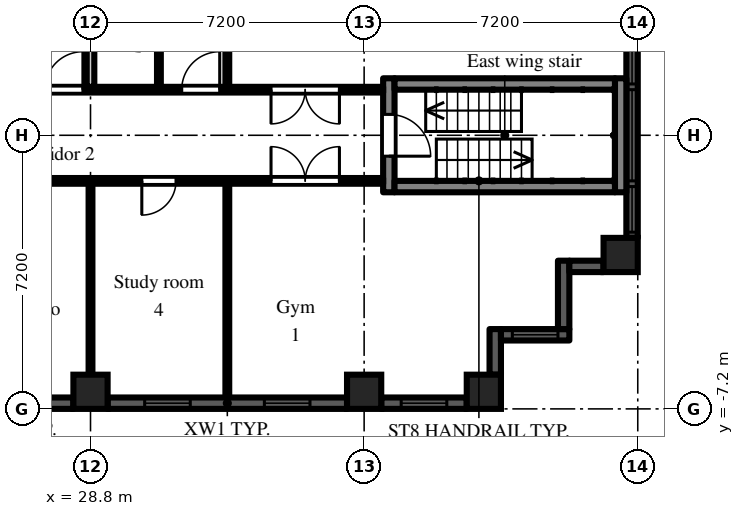
"""IFC4 building model, lengths in metres.
Left out: names, types, materials, properties, quantities, classifications, styles, units other than length and angle.
Written with IfcOpenShell. Run it as: python <this file> out.ifc"""

import sys

from ifc_helpers import new_model, si_unit, direction, frame, frame_2d, origin, origin_2d, place, context, subcontext, project, spatial, rectangle, extrude, element, fill, save


model = new_model("IFC4")
c1 = context("Model", 3, precision=1e-05, world=origin(), true_north=direction((0.0, 1.0)))
c2 = subcontext(c1, "Body", "Model", "MODEL_VIEW")
j1 = project(units=[si_unit("LENGTHUNIT", "METRE"), si_unit("PLANEANGLEUNIT", "RADIAN")], contexts=[c1])
p1 = place(None, origin())
s1 = spatial("IfcSite", under=j1, at=p1, CompositionType="ELEMENT")
p2 = place(p1, origin())
s2 = spatial("IfcBuilding", under=s1, at=p2, CompositionType="ELEMENT")
p3 = place(p2, frame((0.0, 0.0, 84.9)))
s3 = spatial("IfcBuildingStorey", under=s2, at=p3, CompositionType="ELEMENT", Elevation=84.9)
for number, where, z_axis, x_axis in (
    (1, (28.8, -6.75, 0.0), (0.0, 0.0, 1.0), (1.0, 0.0, 0.0)),
    (2, (36.0, -6.75, 0.0), (0.0, 0.0, 1.0), (1.0, 0.0, 0.0)),
    (3, (39.15, -6.75, 0.0), (0.0, 0.0, 1.0), (1.0, 0.0, 0.0)),
    (4, (42.75, -3.15, 0.0), (0.0, 0.0, 1.0), (1.0, 0.0, 0.0)),
):
    element("IfcColumn", number, at=place(p3, frame(where, z_axis=z_axis, x_axis=x_axis)), inside=s3, PredefinedType="COLUMN", context=c2, shape_type="SweptSolid", body=[
        extrude(rectangle(XDim=0.9, YDim=0.9, at=origin_2d()), origin(), (0.0, 0.0, 1.0), 3.0),
    ])
p4 = place(p3, frame((25.2, -7.05, 0.0), z_axis=(0.0, 0.0, 1.0), x_axis=(1.0, 0.0, 0.0)))
e5 = element("IfcWall", 5, at=p4, inside=s3, PredefinedType="SOLIDWALL", context=c2, shape_type="SweptSolid", body=[
    extrude(rectangle(XDim=3.15, YDim=0.3, at=frame_2d((1.575, 0.0))), origin(), (0.0, 0.0, 1.0), 2.1),
])
p5 = place(p4, frame((0.975, 0.0, 0.2)))
e6 = element("IfcOpeningElement", 6, at=p5, cuts=e5, PredefinedType="OPENING", context=c2, shape_type="SweptSolid", body=[
    extrude(rectangle(XDim=1.2, YDim=1.85, at=frame_2d((0.6, 0.925))), frame((0.0, 0.16, 0.0), z_axis=(0.0, -1.0, 0.0), x_axis=(1.0, 0.0, 0.0)), (0.0, 0.0, 1.0), 0.32),
])
p6 = place(p3, frame((29.25, -7.05, 0.0), z_axis=(0.0, 0.0, 1.0), x_axis=(1.0, 0.0, 0.0)))
e7 = element("IfcWall", 7, at=p6, inside=s3, PredefinedType="SOLIDWALL", context=c2, shape_type="SweptSolid", body=[
    extrude(rectangle(XDim=6.3, YDim=0.3, at=frame_2d((3.15, 0.0))), origin(), (0.0, 0.0, 1.0), 2.1),
])
p7 = place(p6, frame((0.975, 0.0, 0.2)))
e8 = element("IfcOpeningElement", 8, at=p7, cuts=e7, PredefinedType="OPENING", context=c2, shape_type="SweptSolid", body=[
    extrude(rectangle(XDim=1.2, YDim=1.85, at=frame_2d((0.6, 0.925))), frame((0.0, 0.16, 0.0), z_axis=(0.0, -1.0, 0.0), x_axis=(1.0, 0.0, 0.0)), (0.0, 0.0, 1.0), 0.32),
])
p8 = place(p6, frame((4.125, 0.0, 0.2)))
e9 = element("IfcOpeningElement", 9, at=p8, cuts=e7, PredefinedType="OPENING", context=c2, shape_type="SweptSolid", body=[
    extrude(rectangle(XDim=1.2, YDim=1.85, at=frame_2d((0.6, 0.925))), frame((0.0, 0.16, 0.0), z_axis=(0.0, -1.0, 0.0), x_axis=(1.0, 0.0, 0.0)), (0.0, 0.0, 1.0), 0.32),
])
p9 = place(p3, frame((36.45, -7.05, 0.0), z_axis=(0.0, 0.0, 1.0), x_axis=(1.0, 0.0, 0.0)))
e10 = element("IfcWall", 10, at=p9, inside=s3, PredefinedType="SOLIDWALL", context=c2, shape_type="SweptSolid", body=[
    extrude(rectangle(XDim=2.25, YDim=0.3, at=frame_2d((1.125, 0.0))), origin(), (0.0, 0.0, 1.0), 2.1),
])
p10 = place(p9, frame((0.525, 0.0, 0.2)))
e11 = element("IfcOpeningElement", 11, at=p10, cuts=e10, PredefinedType="OPENING", context=c2, shape_type="SweptSolid", body=[
    extrude(rectangle(XDim=1.2, YDim=1.85, at=frame_2d((0.6, 0.925))), frame((0.0, 0.16, 0.0), z_axis=(0.0, -1.0, 0.0), x_axis=(1.0, 0.0, 0.0)), (0.0, 0.0, 1.0), 0.32),
])
p11 = place(p3, frame((39.45, -6.3, 0.0), z_axis=(0.0, 0.0, 1.0), x_axis=(0.0, 1.0, 0.0)))
e12 = element("IfcWall", 12, at=p11, inside=s3, PredefinedType="SOLIDWALL", context=c2, shape_type="SweptSolid", body=[
    extrude(rectangle(XDim=1.2, YDim=0.3, at=frame_2d((0.6, 0.0))), origin(), (0.0, 0.0, 1.0), 2.575),
])
p12 = place(p3, frame((39.6, -5.25, 0.0), z_axis=(0.0, 0.0, 1.0), x_axis=(1.0, 0.0, 0.0)))
e13 = element("IfcWall", 13, at=p12, inside=s3, PredefinedType="SOLIDWALL", context=c2, shape_type="SweptSolid", body=[
    extrude(rectangle(XDim=1.8, YDim=0.3, at=frame_2d((0.9, 0.0))), origin(), (0.0, 0.0, 1.0), 2.575),
])
p13 = place(p12, frame((0.3, 0.0, 0.2)))
e14 = element("IfcOpeningElement", 14, at=p13, cuts=e13, PredefinedType="OPENING", context=c2, shape_type="SweptSolid", body=[
    extrude(rectangle(XDim=1.2, YDim=1.85, at=frame_2d((0.6, 0.925))), frame((0.0, 0.16, 0.0), z_axis=(0.0, -1.0, 0.0), x_axis=(1.0, 0.0, 0.0)), (0.0, 0.0, 1.0), 0.32),
])
p14 = place(p3, frame((41.25, -5.1, 0.0), z_axis=(0.0, 0.0, 1.0), x_axis=(0.0, 1.0, 0.0)))
e15 = element("IfcWall", 15, at=p14, inside=s3, PredefinedType="SOLIDWALL", context=c2, shape_type="SweptSolid", body=[
    extrude(rectangle(XDim=1.8, YDim=0.3, at=frame_2d((0.9, 0.0))), origin(), (0.0, 0.0, 1.0), 2.575),
])
p15 = place(p3, frame((41.4, -3.45, 0.0), z_axis=(0.0, 0.0, 1.0), x_axis=(1.0, 0.0, 0.0)))
e16 = element("IfcWall", 16, at=p15, inside=s3, PredefinedType="SOLIDWALL", context=c2, shape_type="SweptSolid", body=[
    extrude(rectangle(XDim=0.9, YDim=0.3, at=frame_2d((0.45, 0.0))), origin(), (0.0, 0.0, 1.0), 2.575),
])
p16 = place(p3, frame((43.05, -2.7, 0.0), z_axis=(0.0, 0.0, 1.0), x_axis=(0.0, 1.0, 0.0)))
e17 = element("IfcWall", 17, at=p16, inside=s3, PredefinedType="SOLIDWALL", context=c2, shape_type="SweptSolid", body=[
    extrude(rectangle(XDim=5.4, YDim=0.3, at=frame_2d((2.7, 0.0))), origin(), (0.0, 0.0, 1.0), 2.1),
])
p17 = place(p16, frame((1.5, 0.0, 0.2)))
e18 = element("IfcOpeningElement", 18, at=p17, cuts=e17, PredefinedType="OPENING", context=c2, shape_type="SweptSolid", body=[
    extrude(rectangle(XDim=2.4, YDim=1.85, at=frame_2d((1.2, 0.925))), frame((0.0, 0.16, 0.0), z_axis=(0.0, -1.0, 0.0), x_axis=(1.0, 0.0, 0.0)), (0.0, 0.0, 1.0), 0.32),
])
p18 = place(p16, frame((0.15, 0.0, 0.2)))
e19 = element("IfcOpeningElement", 19, at=p18, cuts=e17, PredefinedType="OPENING", context=c2, shape_type="SweptSolid", body=[
    extrude(rectangle(XDim=1.2, YDim=1.85, at=frame_2d((0.6, 0.925))), frame((0.0, 0.16, 0.0), z_axis=(0.0, -1.0, 0.0), x_axis=(1.0, 0.0, 0.0)), (0.0, 0.0, 1.0), 0.32),
])
p19 = place(p16, frame((4.05, 0.0, 0.2)))
e20 = element("IfcOpeningElement", 20, at=p19, cuts=e17, PredefinedType="OPENING", context=c2, shape_type="SweptSolid", body=[
    extrude(rectangle(XDim=1.2, YDim=1.85, at=frame_2d((0.6, 0.925))), frame((0.0, 0.16, 0.0), z_axis=(0.0, -1.0, 0.0), x_axis=(1.0, 0.0, 0.0)), (0.0, 0.0, 1.0), 0.32),
])
p20 = place(p3, frame((36.65, -1.5, 0.0), z_axis=(0.0, 0.0, 1.0), x_axis=(0.0, 1.0, 0.0)))
e21 = element("IfcWall", 21, at=p20, inside=s3, PredefinedType="SHEAR", context=c2, shape_type="SweptSolid", body=[
    extrude(rectangle(XDim=3.0, YDim=0.3, at=frame_2d((1.5, 0.0))), origin(), (0.0, 0.0, 1.0), 2.575),
])
p21 = place(p20, frame((0.95, 0.0, 0.0)))
e22 = element("IfcOpeningElement", 22, at=p21, cuts=e21, PredefinedType="OPENING", context=c2, shape_type="SweptSolid", body=[
    extrude(rectangle(XDim=1.1, YDim=2.1, at=frame_2d((0.55, 1.05))), frame((0.0, 0.16, 0.0), z_axis=(0.0, -1.0, 0.0), x_axis=(1.0, 0.0, 0.0)), (0.0, 0.0, 1.0), 0.32),
])
p22 = place(p3, frame((42.75, -1.5, 0.0), z_axis=(0.0, 0.0, 1.0), x_axis=(0.0, 1.0, 0.0)))
e23 = element("IfcWall", 23, at=p22, inside=s3, PredefinedType="SHEAR", context=c2, shape_type="SweptSolid", body=[
    extrude(rectangle(XDim=3.0, YDim=0.3, at=frame_2d((1.5, 0.0))), origin(), (0.0, 0.0, 1.0), 2.575),
])
for number, where, z_axis, x_axis in (
    (24, (36.8, -1.35, 0.0), (0.0, 0.0, 1.0), (1.0, 0.0, 0.0)),
    (25, (36.8, 1.35, 0.0), (0.0, 0.0, 1.0), (1.0, 0.0, 0.0)),
):
    element("IfcWall", number, at=place(p3, frame(where, z_axis=z_axis, x_axis=x_axis)), inside=s3, PredefinedType="SHEAR", context=c2, shape_type="SweptSolid", body=[
        extrude(rectangle(XDim=5.8, YDim=0.3, at=frame_2d((2.9, 0.0))), origin(), (0.0, 0.0, 1.0), 2.575),
    ])
p23 = place(p3, frame((21.6, -1.2, 0.0), z_axis=(0.0, 0.0, 1.0), x_axis=(1.0, 0.0, 0.0)))
e26 = element("IfcWall", 26, at=p23, inside=s3, PredefinedType="PARTITIONING", context=c2, shape_type="SweptSolid", body=[
    extrude(rectangle(XDim=14.9, YDim=0.15, at=frame_2d((7.45, 0.0))), origin(), (0.0, 0.0, 1.0), 2.575),
])
p24 = place(p23, frame((2.7, 0.0, 0.0)))
e27 = element("IfcOpeningElement", 27, at=p24, cuts=e26, PredefinedType="OPENING", context=c2, shape_type="SweptSolid", body=[
    extrude(rectangle(XDim=1.8, YDim=2.1, at=frame_2d((0.9, 1.05))), frame((0.0, 0.085, 0.0), z_axis=(0.0, -1.0, 0.0), x_axis=(1.0, 0.0, 0.0)), (0.0, 0.0, 1.0), 0.17),
])
p25 = place(p23, frame((8.55, 0.0, 0.0)))
e28 = element("IfcOpeningElement", 28, at=p25, cuts=e26, PredefinedType="OPENING", context=c2, shape_type="SweptSolid", body=[
    extrude(rectangle(XDim=0.9, YDim=2.1, at=frame_2d((0.45, 1.05))), frame((0.0, 0.085, 0.0), z_axis=(0.0, -1.0, 0.0), x_axis=(1.0, 0.0, 0.0)), (0.0, 0.0, 1.0), 0.17),
])
p26 = place(p23, frame((11.95, 0.0, 0.0)))
e29 = element("IfcOpeningElement", 29, at=p26, cuts=e26, PredefinedType="OPENING", context=c2, shape_type="SweptSolid", body=[
    extrude(rectangle(XDim=1.8, YDim=2.1, at=frame_2d((0.9, 1.05))), frame((0.0, 0.085, 0.0), z_axis=(0.0, -1.0, 0.0), x_axis=(1.0, 0.0, 0.0)), (0.0, 0.0, 1.0), 0.17),
])
p27 = place(p3, frame((21.6, 1.2, 0.0), z_axis=(0.0, 0.0, 1.0), x_axis=(1.0, 0.0, 0.0)))
e30 = element("IfcWall", 30, at=p27, inside=s3, PredefinedType="PARTITIONING", context=c2, shape_type="SweptSolid", body=[
    extrude(rectangle(XDim=14.9, YDim=0.15, at=frame_2d((7.45, 0.0))), origin(), (0.0, 0.0, 1.0), 2.575),
])
p28 = place(p27, frame((6.0, 0.0, 0.0)))
e31 = element("IfcOpeningElement", 31, at=p28, cuts=e30, PredefinedType="OPENING", context=c2, shape_type="SweptSolid", body=[
    extrude(rectangle(XDim=1.0, YDim=2.1, at=frame_2d((0.5, 1.05))), frame((0.0, 0.085, 0.0), z_axis=(0.0, -1.0, 0.0), x_axis=(1.0, 0.0, 0.0)), (0.0, 0.0, 1.0), 0.17),
])
p29 = place(p27, frame((9.6, 0.0, 0.0)))
e32 = element("IfcOpeningElement", 32, at=p29, cuts=e30, PredefinedType="OPENING", context=c2, shape_type="SweptSolid", body=[
    extrude(rectangle(XDim=1.0, YDim=2.1, at=frame_2d((0.5, 1.05))), frame((0.0, 0.085, 0.0), z_axis=(0.0, -1.0, 0.0), x_axis=(1.0, 0.0, 0.0)), (0.0, 0.0, 1.0), 0.17),
])
p30 = place(p27, frame((11.95, 0.0, 0.0)))
e33 = element("IfcOpeningElement", 33, at=p30, cuts=e30, PredefinedType="OPENING", context=c2, shape_type="SweptSolid", body=[
    extrude(rectangle(XDim=1.8, YDim=2.1, at=frame_2d((0.9, 1.05))), frame((0.0, 0.085, 0.0), z_axis=(0.0, -1.0, 0.0), x_axis=(1.0, 0.0, 0.0)), (0.0, 0.0, 1.0), 0.17),
])
p31 = place(p3, frame((28.8, -6.9, 0.0), z_axis=(0.0, 0.0, 1.0), x_axis=(0.0, 1.0, 0.0)))
e34 = element("IfcWall", 34, at=p31, inside=s3, PredefinedType="PARTITIONING", context=c2, shape_type="SweptSolid", body=[
    extrude(rectangle(XDim=5.625, YDim=0.1, at=frame_2d((2.812, 0.0))), origin(), (0.0, 0.0, 1.0), 2.575),
])
p32 = place(p3, frame((28.8, 1.275, 0.0), z_axis=(0.0, 0.0, 1.0), x_axis=(0.0, 1.0, 0.0)))
e35 = element("IfcWall", 35, at=p32, inside=s3, PredefinedType="PARTITIONING", context=c2, shape_type="SweptSolid", body=[
    extrude(rectangle(XDim=5.625, YDim=0.2, at=frame_2d((2.812, 0.0))), origin(), (0.0, 0.0, 1.0), 2.575),
])
p33 = place(p3, frame((30.6, 1.275, 0.0), z_axis=(0.0, 0.0, 1.0), x_axis=(0.0, 1.0, 0.0)))
e36 = element("IfcWall", 36, at=p33, inside=s3, PredefinedType="PARTITIONING", context=c2, shape_type="SweptSolid", body=[
    extrude(rectangle(XDim=1.675, YDim=0.1, at=frame_2d((0.837, 0.0))), origin(), (0.0, 0.0, 1.0), 2.575),
])
for number, where, z_axis, x_axis in (
    (37, (32.4, -6.9, 0.0), (0.0, 0.0, 1.0), (0.0, 1.0, 0.0)),
    (38, (32.4, 1.275, 0.0), (0.0, 0.0, 1.0), (0.0, 1.0, 0.0)),
):
    element("IfcWall", number, at=place(p3, frame(where, z_axis=z_axis, x_axis=x_axis)), inside=s3, PredefinedType="PARTITIONING", context=c2, shape_type="SweptSolid", body=[
        extrude(rectangle(XDim=5.625, YDim=0.1, at=frame_2d((2.812, 0.0))), origin(), (0.0, 0.0, 1.0), 2.575),
    ])
p34 = place(p7, origin())
e39 = element("IfcWindow", 39, at=p34, inside=s3, PartitioningType="SINGLE_PANEL", PredefinedType="WINDOW", context=c2, shape_type="SweptSolid", body=[
    extrude(rectangle(XDim=1.2, YDim=1.85, at=frame_2d((0.6, 0.925))), frame((0.0, 0.03, 0.0), z_axis=(0.0, -1.0, 0.0), x_axis=(1.0, 0.0, 0.0)), (0.0, 0.0, 1.0), 0.06),
])
fill(e8, e39)
p35 = place(p8, origin())
e40 = element("IfcWindow", 40, at=p35, inside=s3, PartitioningType="SINGLE_PANEL", PredefinedType="WINDOW", context=c2, shape_type="SweptSolid", body=[
    extrude(rectangle(XDim=1.2, YDim=1.85, at=frame_2d((0.6, 0.925))), frame((0.0, 0.03, 0.0), z_axis=(0.0, -1.0, 0.0), x_axis=(1.0, 0.0, 0.0)), (0.0, 0.0, 1.0), 0.06),
])
fill(e9, e40)
p36 = place(p10, origin())
e41 = element("IfcWindow", 41, at=p36, inside=s3, PartitioningType="SINGLE_PANEL", PredefinedType="WINDOW", context=c2, shape_type="SweptSolid", body=[
    extrude(rectangle(XDim=1.2, YDim=1.85, at=frame_2d((0.6, 0.925))), frame((0.0, 0.03, 0.0), z_axis=(0.0, -1.0, 0.0), x_axis=(1.0, 0.0, 0.0)), (0.0, 0.0, 1.0), 0.06),
])
fill(e11, e41)
p37 = place(p13, origin())
e42 = element("IfcWindow", 42, at=p37, inside=s3, PartitioningType="SINGLE_PANEL", PredefinedType="WINDOW", context=c2, shape_type="SweptSolid", body=[
    extrude(rectangle(XDim=1.2, YDim=1.85, at=frame_2d((0.6, 0.925))), frame((0.0, 0.03, 0.0), z_axis=(0.0, -1.0, 0.0), x_axis=(1.0, 0.0, 0.0)), (0.0, 0.0, 1.0), 0.06),
])
fill(e14, e42)
p38 = place(p17, origin())
e43 = element("IfcWindow", 43, at=p38, inside=s3, PartitioningType="SINGLE_PANEL", PredefinedType="WINDOW", context=c2, shape_type="SweptSolid", body=[
    extrude(rectangle(XDim=2.4, YDim=1.85, at=frame_2d((1.2, 0.925))), frame((0.0, 0.03, 0.0), z_axis=(0.0, -1.0, 0.0), x_axis=(1.0, 0.0, 0.0)), (0.0, 0.0, 1.0), 0.06),
])
fill(e18, e43)
p39 = place(p18, origin())
e44 = element("IfcWindow", 44, at=p39, inside=s3, PartitioningType="SINGLE_PANEL", PredefinedType="WINDOW", context=c2, shape_type="SweptSolid", body=[
    extrude(rectangle(XDim=1.2, YDim=1.85, at=frame_2d((0.6, 0.925))), frame((0.0, 0.03, 0.0), z_axis=(0.0, -1.0, 0.0), x_axis=(1.0, 0.0, 0.0)), (0.0, 0.0, 1.0), 0.06),
])
fill(e19, e44)
p40 = place(p19, origin())
e45 = element("IfcWindow", 45, at=p40, inside=s3, PartitioningType="SINGLE_PANEL", PredefinedType="WINDOW", context=c2, shape_type="SweptSolid", body=[
    extrude(rectangle(XDim=1.2, YDim=1.85, at=frame_2d((0.6, 0.925))), frame((0.0, 0.03, 0.0), z_axis=(0.0, -1.0, 0.0), x_axis=(1.0, 0.0, 0.0)), (0.0, 0.0, 1.0), 0.06),
])
fill(e20, e45)
p41 = place(p21, frame((1.1, 0.0, 0.0), z_axis=(0.0, 0.0, 1.0), x_axis=(-1.0, 0.0, 0.0)))
e46 = element("IfcDoor", 46, at=p41, inside=s3, OperationType="SINGLE_SWING_RIGHT", PredefinedType="DOOR", context=c2, shape_type="SweptSolid", body=[
    extrude(rectangle(XDim=1.1, YDim=2.1, at=frame_2d((0.55, 1.05))), frame((0.0, 0.025, 0.0), z_axis=(0.0, -1.0, 0.0), x_axis=(1.0, 0.0, 0.0)), (0.0, 0.0, 1.0), 0.05),
])
fill(e22, e46)
p42 = place(p28, origin())
e47 = element("IfcDoor", 47, at=p42, inside=s3, OperationType="SINGLE_SWING_RIGHT", PredefinedType="DOOR", context=c2, shape_type="SweptSolid", body=[
    extrude(rectangle(XDim=1.0, YDim=2.1, at=frame_2d((0.5, 1.05))), frame((0.0, 0.025, 0.0), z_axis=(0.0, -1.0, 0.0), x_axis=(1.0, 0.0, 0.0)), (0.0, 0.0, 1.0), 0.05),
])
fill(e31, e47)
p43 = place(p29, origin())
e48 = element("IfcDoor", 48, at=p43, inside=s3, OperationType="SINGLE_SWING_RIGHT", PredefinedType="DOOR", context=c2, shape_type="SweptSolid", body=[
    extrude(rectangle(XDim=1.0, YDim=2.1, at=frame_2d((0.5, 1.05))), frame((0.0, 0.025, 0.0), z_axis=(0.0, -1.0, 0.0), x_axis=(1.0, 0.0, 0.0)), (0.0, 0.0, 1.0), 0.05),
])
fill(e32, e48)
p44 = place(p30, frame((1.8, 0.0, 0.0), z_axis=(0.0, 0.0, 1.0), x_axis=(-1.0, 0.0, 0.0)))
e49 = element("IfcDoor", 49, at=p44, inside=s3, OperationType="DOUBLE_DOOR_DOUBLE_SWING", PredefinedType="DOOR", context=c2, shape_type="SweptSolid", body=[
    extrude(rectangle(XDim=1.8, YDim=2.1, at=frame_2d((0.9, 1.05))), frame((0.0, 0.025, 0.0), z_axis=(0.0, -1.0, 0.0), x_axis=(1.0, 0.0, 0.0)), (0.0, 0.0, 1.0), 0.05),
])
fill(e33, e49)
p45 = place(p25, frame((0.9, 0.0, 0.0), z_axis=(0.0, 0.0, 1.0), x_axis=(-1.0, 0.0, 0.0)))
e50 = element("IfcDoor", 50, at=p45, inside=s3, OperationType="SINGLE_SWING_RIGHT", PredefinedType="DOOR", context=c2, shape_type="SweptSolid", body=[
    extrude(rectangle(XDim=0.9, YDim=2.1, at=frame_2d((0.45, 1.05))), frame((0.0, 0.025, 0.0), z_axis=(0.0, -1.0, 0.0), x_axis=(1.0, 0.0, 0.0)), (0.0, 0.0, 1.0), 0.05),
])
fill(e28, e50)
p46 = place(p26, origin())
e51 = element("IfcDoor", 51, at=p46, inside=s3, OperationType="DOUBLE_DOOR_DOUBLE_SWING", PredefinedType="DOOR", context=c2, shape_type="SweptSolid", body=[
    extrude(rectangle(XDim=1.8, YDim=2.1, at=frame_2d((0.9, 1.05))), frame((0.0, 0.025, 0.0), z_axis=(0.0, -1.0, 0.0), x_axis=(1.0, 0.0, 0.0)), (0.0, 0.0, 1.0), 0.05),
])
fill(e29, e51)
save(model, sys.argv[1])
